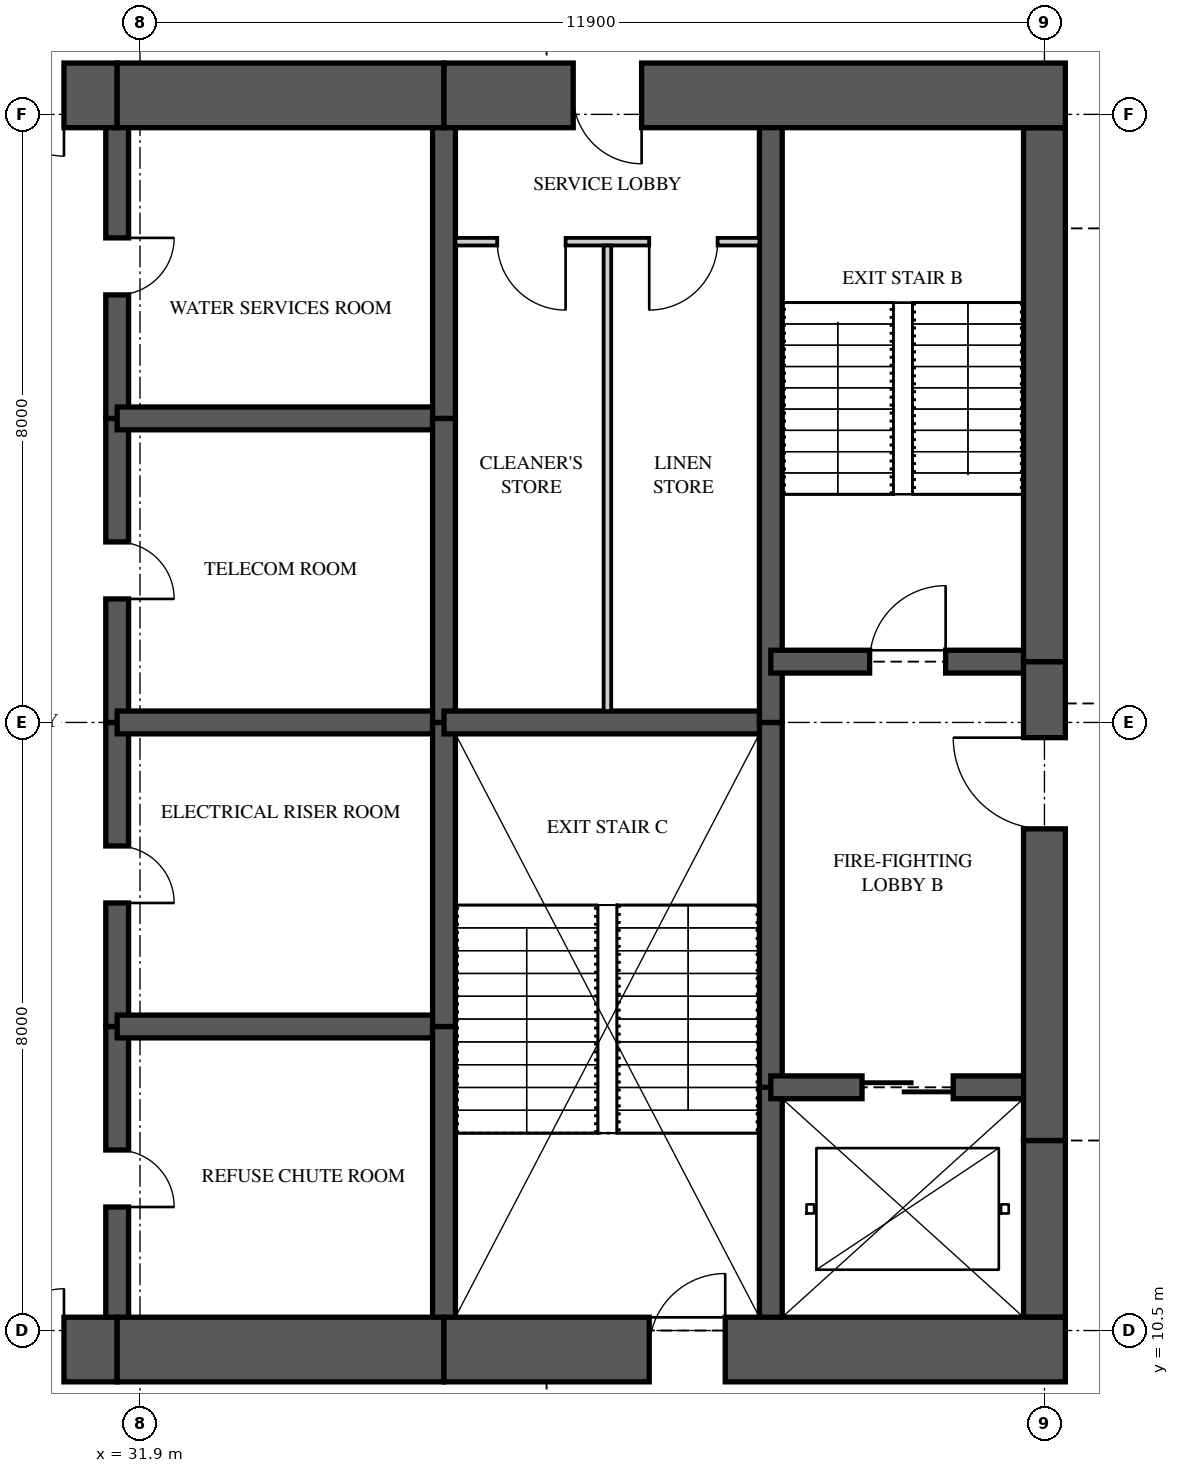
"""IFC4 building model, lengths in metres.
Left out: names, types, materials, properties, quantities, classifications, styles, units other than length and angle.
Written with IfcOpenShell. Run it as: python <this file> out.ifc"""

import sys

from ifc_helpers import new_model, si_unit, direction, frame, frame_2d, origin, place, context, subcontext, project, spatial, rectangle, extrude, element, fill, save


model = new_model("IFC4")
c1 = context("Model", 3, precision=1e-05, world=origin(), true_north=direction((0.0, 1.0)))
c2 = subcontext(c1, "Body", "Model", "MODEL_VIEW")
j1 = project(units=[si_unit("LENGTHUNIT", "METRE"), si_unit("PLANEANGLEUNIT", "RADIAN")], contexts=[c1])
p1 = place(None, origin())
s1 = spatial("IfcSite", under=j1, at=p1, CompositionType="ELEMENT")
p2 = place(p1, origin())
s2 = spatial("IfcBuilding", under=s1, at=p2, CompositionType="ELEMENT")
p3 = place(p2, frame((0.0, 0.0, 267.75)))
s3 = spatial("IfcBuildingStorey", under=s2, at=p3, CompositionType="ELEMENT", Elevation=267.75)
p4 = place(p3, frame((26.0, 10.25, 0.0), z_axis=(0.0, 0.0, 1.0), x_axis=(1.0, 0.0, 0.0)))
e1 = element("IfcWall", 1, at=p4, inside=s3, PredefinedType="SHEAR", context=c2, shape_type="SweptSolid", body=[
    extrude(rectangle(XDim=5.6, YDim=0.85, at=frame_2d((2.8, 0.0))), origin(), (0.0, 0.0, 1.0), 5.0),
])
p5 = place(p4, frame((3.3, 0.0, 0.0)))
e2 = element("IfcOpeningElement", 2, at=p5, cuts=e1, PredefinedType="OPENING", context=c2, shape_type="SweptSolid", body=[
    extrude(rectangle(XDim=1.6, YDim=2.1, at=frame_2d((0.8, 1.05))), frame((0.0, 0.435, 0.0), z_axis=(0.0, -1.0, 0.0), x_axis=(1.0, 0.0, 0.0)), (0.0, 0.0, 1.0), 0.87),
])
p6 = place(p3, frame((31.6, 10.25, 0.0), z_axis=(0.0, 0.0, 1.0), x_axis=(1.0, 0.0, 0.0)))
e3 = element("IfcWall", 3, at=p6, inside=s3, PredefinedType="SHEAR", context=c2, shape_type="SweptSolid", body=[
    extrude(rectangle(XDim=4.3, YDim=0.85, at=frame_2d((2.15, 0.0))), origin(), (0.0, 0.0, 1.0), 5.0),
])
p7 = place(p3, frame((35.9, 10.25, 0.0), z_axis=(0.0, 0.0, 1.0), x_axis=(1.0, 0.0, 0.0)))
e4 = element("IfcWall", 4, at=p7, inside=s3, PredefinedType="SHEAR", context=c2, shape_type="SweptSolid", body=[
    extrude(rectangle(XDim=8.175, YDim=0.85, at=frame_2d((4.087, 0.0))), origin(), (0.0, 0.0, 1.0), 5.0),
])
p8 = place(p7, frame((2.7, 0.0, 0.0)))
e5 = element("IfcOpeningElement", 5, at=p8, cuts=e4, PredefinedType="OPENING", context=c2, shape_type="SweptSolid", body=[
    extrude(rectangle(XDim=1.0, YDim=2.1, at=frame_2d((0.5, 1.05))), frame((0.0, 0.435, 0.0), z_axis=(0.0, -1.0, 0.0), x_axis=(1.0, 0.0, 0.0)), (0.0, 0.0, 1.0), 0.87),
])
p9 = place(p3, frame((44.075, 26.75, 0.0), z_axis=(0.0, 0.0, 1.0), x_axis=(-1.0, 0.0, 0.0)))
e6 = element("IfcWall", 6, at=p9, inside=s3, PredefinedType="SHEAR", context=c2, shape_type="SweptSolid", body=[
    extrude(rectangle(XDim=8.175, YDim=0.85, at=frame_2d((4.087, 0.0))), origin(), (0.0, 0.0, 1.0), 5.0),
])
p10 = place(p9, frame((5.575, 0.0, 0.0)))
e7 = element("IfcOpeningElement", 7, at=p10, cuts=e6, PredefinedType="OPENING", context=c2, shape_type="SweptSolid", body=[
    extrude(rectangle(XDim=0.9, YDim=2.1, at=frame_2d((0.45, 1.05))), frame((0.0, 0.435, 0.0), z_axis=(0.0, -1.0, 0.0), x_axis=(1.0, 0.0, 0.0)), (0.0, 0.0, 1.0), 0.87),
])
p11 = place(p3, frame((35.9, 26.75, 0.0), z_axis=(0.0, 0.0, 1.0), x_axis=(-1.0, 0.0, 0.0)))
e8 = element("IfcWall", 8, at=p11, inside=s3, PredefinedType="SHEAR", context=c2, shape_type="SweptSolid", body=[
    extrude(rectangle(XDim=4.3, YDim=0.85, at=frame_2d((2.15, 0.0))), origin(), (0.0, 0.0, 1.0), 5.0),
])
p12 = place(p3, frame((31.6, 26.75, 0.0), z_axis=(0.0, 0.0, 1.0), x_axis=(-1.0, 0.0, 0.0)))
e9 = element("IfcWall", 9, at=p12, inside=s3, PredefinedType="SHEAR", context=c2, shape_type="SweptSolid", body=[
    extrude(rectangle(XDim=5.6, YDim=0.85, at=frame_2d((2.8, 0.0))), origin(), (0.0, 0.0, 1.0), 5.0),
])
p13 = place(p12, frame((0.7, 0.0, 0.0)))
e10 = element("IfcOpeningElement", 10, at=p13, cuts=e9, PredefinedType="OPENING", context=c2, shape_type="SweptSolid", body=[
    extrude(rectangle(XDim=1.6, YDim=2.1, at=frame_2d((0.8, 1.05))), frame((0.0, 0.435, 0.0), z_axis=(0.0, -1.0, 0.0), x_axis=(1.0, 0.0, 0.0)), (0.0, 0.0, 1.0), 0.87),
])
p14 = place(p3, frame((43.8, 10.675, 0.0), z_axis=(0.0, 0.0, 1.0), x_axis=(0.0, 1.0, 0.0)))
e11 = element("IfcWall", 11, at=p14, inside=s3, PredefinedType="SHEAR", context=c2, shape_type="SweptSolid", body=[
    extrude(rectangle(XDim=2.325, YDim=0.55, at=frame_2d((1.163, 0.0))), origin(), (0.0, 0.0, 1.0), 5.0),
])
p15 = place(p3, frame((43.8, 13.0, 0.0), z_axis=(0.0, 0.0, 1.0), x_axis=(0.0, 1.0, 0.0)))
e12 = element("IfcWall", 12, at=p15, inside=s3, PredefinedType="SHEAR", context=c2, shape_type="SweptSolid", body=[
    extrude(rectangle(XDim=6.3, YDim=0.55, at=frame_2d((3.15, 0.0))), origin(), (0.0, 0.0, 1.0), 5.0),
])
p16 = place(p15, frame((4.1, 0.0, 0.0)))
e13 = element("IfcOpeningElement", 13, at=p16, cuts=e12, PredefinedType="OPENING", context=c2, shape_type="SweptSolid", body=[
    extrude(rectangle(XDim=1.2, YDim=2.2, at=frame_2d((0.6, 1.1))), frame((0.0, 0.285, 0.0), z_axis=(0.0, -1.0, 0.0), x_axis=(1.0, 0.0, 0.0)), (0.0, 0.0, 1.0), 0.57),
])
p17 = place(p3, frame((43.8, 19.3, 0.0), z_axis=(0.0, 0.0, 1.0), x_axis=(0.0, 1.0, 0.0)))
e14 = element("IfcWall", 14, at=p17, inside=s3, PredefinedType="SHEAR", context=c2, shape_type="SweptSolid", body=[
    extrude(rectangle(XDim=7.025, YDim=0.55, at=frame_2d((3.512, 0.0))), origin(), (0.0, 0.0, 1.0), 5.0),
])
p18 = place(p3, frame((31.6, 10.25, 0.0), z_axis=(0.0, 0.0, 1.0), x_axis=(0.0, 1.0, 0.0)))
e15 = element("IfcWall", 15, at=p18, inside=s3, PredefinedType="SHEAR", context=c2, shape_type="SweptSolid", body=[
    extrude(rectangle(XDim=4.25, YDim=0.3, at=frame_2d((2.125, 0.0))), origin(), (0.0, 0.0, 1.0), 5.0),
])
p19 = place(p18, frame((1.875, 0.0, 0.0)))
e16 = element("IfcOpeningElement", 16, at=p19, cuts=e15, PredefinedType="OPENING", context=c2, shape_type="SweptSolid", body=[
    extrude(rectangle(XDim=0.75, YDim=2.1, at=frame_2d((0.375, 1.05))), frame((0.0, 0.16, 0.0), z_axis=(0.0, -1.0, 0.0), x_axis=(1.0, 0.0, 0.0)), (0.0, 0.0, 1.0), 0.32),
])
p20 = place(p3, frame((31.6, 14.5, 0.0), z_axis=(0.0, 0.0, 1.0), x_axis=(0.0, 1.0, 0.0)))
e17 = element("IfcWall", 17, at=p20, inside=s3, PredefinedType="SHEAR", context=c2, shape_type="SweptSolid", body=[
    extrude(rectangle(XDim=4.0, YDim=0.3, at=frame_2d((2.0, 0.0))), origin(), (0.0, 0.0, 1.0), 5.0),
])
p21 = place(p20, frame((1.625, 0.0, 0.0)))
e18 = element("IfcOpeningElement", 18, at=p21, cuts=e17, PredefinedType="OPENING", context=c2, shape_type="SweptSolid", body=[
    extrude(rectangle(XDim=0.75, YDim=2.1, at=frame_2d((0.375, 1.05))), frame((0.0, 0.16, 0.0), z_axis=(0.0, -1.0, 0.0), x_axis=(1.0, 0.0, 0.0)), (0.0, 0.0, 1.0), 0.32),
])
p22 = place(p3, frame((31.6, 18.5, 0.0), z_axis=(0.0, 0.0, 1.0), x_axis=(0.0, 1.0, 0.0)))
e19 = element("IfcWall", 19, at=p22, inside=s3, PredefinedType="SHEAR", context=c2, shape_type="SweptSolid", body=[
    extrude(rectangle(XDim=4.0, YDim=0.3, at=frame_2d((2.0, 0.0))), origin(), (0.0, 0.0, 1.0), 5.0),
])
p23 = place(p22, frame((1.625, 0.0, 0.0)))
e20 = element("IfcOpeningElement", 20, at=p23, cuts=e19, PredefinedType="OPENING", context=c2, shape_type="SweptSolid", body=[
    extrude(rectangle(XDim=0.75, YDim=2.1, at=frame_2d((0.375, 1.05))), frame((0.0, 0.16, 0.0), z_axis=(0.0, -1.0, 0.0), x_axis=(1.0, 0.0, 0.0)), (0.0, 0.0, 1.0), 0.32),
])
p24 = place(p3, frame((31.6, 22.5, 0.0), z_axis=(0.0, 0.0, 1.0), x_axis=(0.0, 1.0, 0.0)))
e21 = element("IfcWall", 21, at=p24, inside=s3, PredefinedType="SHEAR", context=c2, shape_type="SweptSolid", body=[
    extrude(rectangle(XDim=4.25, YDim=0.3, at=frame_2d((2.125, 0.0))), origin(), (0.0, 0.0, 1.0), 5.0),
])
p25 = place(p24, frame((1.625, 0.0, 0.0)))
e22 = element("IfcOpeningElement", 22, at=p25, cuts=e21, PredefinedType="OPENING", context=c2, shape_type="SweptSolid", body=[
    extrude(rectangle(XDim=0.75, YDim=2.1, at=frame_2d((0.375, 1.05))), frame((0.0, 0.16, 0.0), z_axis=(0.0, -1.0, 0.0), x_axis=(1.0, 0.0, 0.0)), (0.0, 0.0, 1.0), 0.32),
])
p26 = place(p3, frame((35.9, 10.25, 0.0), z_axis=(0.0, 0.0, 1.0), x_axis=(0.0, 1.0, 0.0)))
e23 = element("IfcWall", 23, at=p26, inside=s3, PredefinedType="SHEAR", context=c2, shape_type="SweptSolid", body=[
    extrude(rectangle(XDim=4.25, YDim=0.3, at=frame_2d((2.125, 0.0))), origin(), (0.0, 0.0, 1.0), 5.0),
])
for number, where, z_axis, x_axis in (
    (24, (35.9, 14.5, 0.0), (0.0, 0.0, 1.0), (0.0, 1.0, 0.0)),
    (25, (35.9, 18.5, 0.0), (0.0, 0.0, 1.0), (0.0, 1.0, 0.0)),
):
    element("IfcWall", number, at=place(p3, frame(where, z_axis=z_axis, x_axis=x_axis)), inside=s3, PredefinedType="SHEAR", context=c2, shape_type="SweptSolid", body=[
        extrude(rectangle(XDim=4.0, YDim=0.3, at=frame_2d((2.0, 0.0))), origin(), (0.0, 0.0, 1.0), 5.0),
    ])
p27 = place(p3, frame((35.9, 22.5, 0.0), z_axis=(0.0, 0.0, 1.0), x_axis=(0.0, 1.0, 0.0)))
e26 = element("IfcWall", 26, at=p27, inside=s3, PredefinedType="SHEAR", context=c2, shape_type="SweptSolid", body=[
    extrude(rectangle(XDim=4.25, YDim=0.3, at=frame_2d((2.125, 0.0))), origin(), (0.0, 0.0, 1.0), 5.0),
])
p28 = place(p3, frame((40.2, 10.25, 0.0), z_axis=(0.0, 0.0, 1.0), x_axis=(0.0, 1.0, 0.0)))
e27 = element("IfcWall", 27, at=p28, inside=s3, PredefinedType="SHEAR", context=c2, shape_type="SweptSolid", body=[
    extrude(rectangle(XDim=3.45, YDim=0.3, at=frame_2d((1.725, 0.0))), origin(), (0.0, 0.0, 1.0), 5.0),
])
p29 = place(p3, frame((40.2, 13.7, 0.0), z_axis=(0.0, 0.0, 1.0), x_axis=(0.0, 1.0, 0.0)))
e28 = element("IfcWall", 28, at=p29, inside=s3, PredefinedType="SHEAR", context=c2, shape_type="SweptSolid", body=[
    extrude(rectangle(XDim=4.8, YDim=0.3, at=frame_2d((2.4, 0.0))), origin(), (0.0, 0.0, 1.0), 5.0),
])
p30 = place(p3, frame((40.2, 18.5, 0.0), z_axis=(0.0, 0.0, 1.0), x_axis=(0.0, 1.0, 0.0)))
e29 = element("IfcWall", 29, at=p30, inside=s3, PredefinedType="SHEAR", context=c2, shape_type="SweptSolid", body=[
    extrude(rectangle(XDim=8.25, YDim=0.3, at=frame_2d((4.125, 0.0))), origin(), (0.0, 0.0, 1.0), 5.0),
])
for number, where, z_axis, x_axis in (
    (30, (31.6, 14.5, 0.0), (0.0, 0.0, 1.0), (1.0, 0.0, 0.0)),
    (31, (31.6, 18.5, 0.0), (0.0, 0.0, 1.0), (1.0, 0.0, 0.0)),
    (32, (31.6, 22.5, 0.0), (0.0, 0.0, 1.0), (1.0, 0.0, 0.0)),
):
    element("IfcWall", number, at=place(p3, frame(where, z_axis=z_axis, x_axis=x_axis)), inside=s3, PredefinedType="SHEAR", context=c2, shape_type="SweptSolid", body=[
        extrude(rectangle(XDim=4.3, YDim=0.3, at=frame_2d((2.15, 0.0))), origin(), (0.0, 0.0, 1.0), 5.0),
    ])
p31 = place(p3, frame((35.9, 18.5, 0.0), z_axis=(0.0, 0.0, 1.0), x_axis=(1.0, 0.0, 0.0)))
e33 = element("IfcWall", 33, at=p31, inside=s3, PredefinedType="SHEAR", context=c2, shape_type="SweptSolid", body=[
    extrude(rectangle(XDim=4.3, YDim=0.3, at=frame_2d((2.15, 0.0))), origin(), (0.0, 0.0, 1.0), 5.0),
])
p32 = place(p3, frame((40.2, 13.7, 0.0), z_axis=(0.0, 0.0, 1.0), x_axis=(1.0, 0.0, 0.0)))
e34 = element("IfcWall", 34, at=p32, inside=s3, PredefinedType="SHEAR", context=c2, shape_type="SweptSolid", body=[
    extrude(rectangle(XDim=3.6, YDim=0.3, at=frame_2d((1.8, 0.0))), origin(), (0.0, 0.0, 1.0), 5.0),
])
p33 = place(p32, frame((1.2, 0.0, 0.0)))
e35 = element("IfcOpeningElement", 35, at=p33, cuts=e34, PredefinedType="OPENING", context=c2, shape_type="SweptSolid", body=[
    extrude(rectangle(XDim=1.2, YDim=2.1, at=frame_2d((0.6, 1.05))), frame((0.0, 0.16, 0.0), z_axis=(0.0, -1.0, 0.0), x_axis=(1.0, 0.0, 0.0)), (0.0, 0.0, 1.0), 0.32),
])
p34 = place(p3, frame((40.2, 19.3, 0.0), z_axis=(0.0, 0.0, 1.0), x_axis=(1.0, 0.0, 0.0)))
e36 = element("IfcWall", 36, at=p34, inside=s3, PredefinedType="SHEAR", context=c2, shape_type="SweptSolid", body=[
    extrude(rectangle(XDim=3.6, YDim=0.3, at=frame_2d((1.8, 0.0))), origin(), (0.0, 0.0, 1.0), 5.0),
])
p35 = place(p34, frame((1.3, 0.0, 0.0)))
e37 = element("IfcOpeningElement", 37, at=p35, cuts=e36, PredefinedType="OPENING", context=c2, shape_type="SweptSolid", body=[
    extrude(rectangle(XDim=1.0, YDim=2.1, at=frame_2d((0.5, 1.05))), frame((0.0, 0.16, 0.0), z_axis=(0.0, -1.0, 0.0), x_axis=(1.0, 0.0, 0.0)), (0.0, 0.0, 1.0), 0.32),
])
p36 = place(p3, frame((36.05, 24.825, 0.0), z_axis=(0.0, 0.0, 1.0), x_axis=(1.0, 0.0, 0.0)))
e38 = element("IfcWall", 38, at=p36, inside=s3, PredefinedType="PARTITIONING", context=c2, shape_type="SweptSolid", body=[
    extrude(rectangle(XDim=4.0, YDim=0.1, at=frame_2d((2.0, 0.0))), origin(), (0.0, 0.0, 1.0), 4.72),
])
p37 = place(p36, frame((0.55, 0.0, 0.0)))
e39 = element("IfcOpeningElement", 39, at=p37, cuts=e38, PredefinedType="OPENING", context=c2, shape_type="SweptSolid", body=[
    extrude(rectangle(XDim=0.9, YDim=2.1, at=frame_2d((0.45, 1.05))), frame((0.0, 0.06, 0.0), z_axis=(0.0, -1.0, 0.0), x_axis=(1.0, 0.0, 0.0)), (0.0, 0.0, 1.0), 0.12),
])
p38 = place(p36, frame((2.55, 0.0, 0.0)))
e40 = element("IfcOpeningElement", 40, at=p38, cuts=e38, PredefinedType="OPENING", context=c2, shape_type="SweptSolid", body=[
    extrude(rectangle(XDim=0.9, YDim=2.1, at=frame_2d((0.45, 1.05))), frame((0.0, 0.06, 0.0), z_axis=(0.0, -1.0, 0.0), x_axis=(1.0, 0.0, 0.0)), (0.0, 0.0, 1.0), 0.12),
])
p39 = place(p3, frame((38.05, 18.65, 0.0), z_axis=(0.0, 0.0, 1.0), x_axis=(0.0, 1.0, 0.0)))
e41 = element("IfcWall", 41, at=p39, inside=s3, PredefinedType="PARTITIONING", context=c2, shape_type="SweptSolid", body=[
    extrude(rectangle(XDim=6.125, YDim=0.1, at=frame_2d((3.062, 0.0))), origin(), (0.0, 0.0, 1.0), 4.72),
])
p40 = place(p37, frame((0.9, 0.0, 0.0), z_axis=(0.0, 0.0, 1.0), x_axis=(-1.0, 0.0, 0.0)))
e42 = element("IfcDoor", 42, at=p40, inside=s3, OperationType="SINGLE_SWING_LEFT", PredefinedType="DOOR", context=c2, shape_type="SweptSolid", body=[
    extrude(rectangle(XDim=0.9, YDim=2.1, at=frame_2d((0.45, 1.05))), frame((0.0, 0.025, 0.0), z_axis=(0.0, -1.0, 0.0), x_axis=(1.0, 0.0, 0.0)), (0.0, 0.0, 1.0), 0.05),
])
fill(e39, e42)
p41 = place(p38, frame((0.9, 0.0, 0.0), z_axis=(0.0, 0.0, 1.0), x_axis=(-1.0, 0.0, 0.0)))
e43 = element("IfcDoor", 43, at=p41, inside=s3, OperationType="SINGLE_SWING_RIGHT", PredefinedType="DOOR", context=c2, shape_type="SweptSolid", body=[
    extrude(rectangle(XDim=0.9, YDim=2.1, at=frame_2d((0.45, 1.05))), frame((0.0, 0.025, 0.0), z_axis=(0.0, -1.0, 0.0), x_axis=(1.0, 0.0, 0.0)), (0.0, 0.0, 1.0), 0.05),
])
fill(e40, e43)
p42 = place(p35, origin())
e44 = element("IfcDoor", 44, at=p42, inside=s3, OperationType="SINGLE_SWING_RIGHT", PredefinedType="DOOR", context=c2, shape_type="SweptSolid", body=[
    extrude(rectangle(XDim=1.0, YDim=2.1, at=frame_2d((0.5, 1.05))), frame((0.0, 0.025, 0.0), z_axis=(0.0, -1.0, 0.0), x_axis=(1.0, 0.0, 0.0)), (0.0, 0.0, 1.0), 0.05),
])
fill(e37, e44)
p43 = place(p16, origin())
e45 = element("IfcDoor", 45, at=p43, inside=s3, OperationType="SINGLE_SWING_RIGHT", PredefinedType="DOOR", context=c2, shape_type="SweptSolid", body=[
    extrude(rectangle(XDim=1.2, YDim=2.2, at=frame_2d((0.6, 1.1))), frame((0.0, 0.025, 0.0), z_axis=(0.0, -1.0, 0.0), x_axis=(1.0, 0.0, 0.0)), (0.0, 0.0, 1.0), 0.05),
])
fill(e13, e45)
p44 = place(p33, origin())
e46 = element("IfcDoor", 46, at=p44, inside=s3, OperationType="SLIDING_TO_LEFT", PredefinedType="DOOR", context=c2, shape_type="SweptSolid", body=[
    extrude(rectangle(XDim=1.2, YDim=2.1, at=frame_2d((0.6, 1.05))), frame((0.0, 0.025, 0.0), z_axis=(0.0, -1.0, 0.0), x_axis=(1.0, 0.0, 0.0)), (0.0, 0.0, 1.0), 0.05),
])
fill(e35, e46)
p45 = place(p5, origin())
e47 = element("IfcDoor", 47, at=p45, inside=s3, OperationType="DOUBLE_DOOR_SINGLE_SWING", PredefinedType="DOOR", context=c2, shape_type="SweptSolid", body=[
    extrude(rectangle(XDim=1.6, YDim=2.1, at=frame_2d((0.8, 1.05))), frame((0.0, 0.025, 0.0), z_axis=(0.0, -1.0, 0.0), x_axis=(1.0, 0.0, 0.0)), (0.0, 0.0, 1.0), 0.05),
])
fill(e2, e47)
p46 = place(p13, origin())
e48 = element("IfcDoor", 48, at=p46, inside=s3, OperationType="DOUBLE_DOOR_SINGLE_SWING", PredefinedType="DOOR", context=c2, shape_type="SweptSolid", body=[
    extrude(rectangle(XDim=1.6, YDim=2.1, at=frame_2d((0.8, 1.05))), frame((0.0, 0.025, 0.0), z_axis=(0.0, -1.0, 0.0), x_axis=(1.0, 0.0, 0.0)), (0.0, 0.0, 1.0), 0.05),
])
fill(e10, e48)
p47 = place(p19, frame((0.75, 0.0, 0.0), z_axis=(0.0, 0.0, 1.0), x_axis=(-1.0, 0.0, 0.0)))
e49 = element("IfcDoor", 49, at=p47, inside=s3, OperationType="SINGLE_SWING_RIGHT", PredefinedType="DOOR", context=c2, shape_type="SweptSolid", body=[
    extrude(rectangle(XDim=0.75, YDim=2.1, at=frame_2d((0.375, 1.05))), frame((0.0, 0.025, 0.0), z_axis=(0.0, -1.0, 0.0), x_axis=(1.0, 0.0, 0.0)), (0.0, 0.0, 1.0), 0.05),
])
fill(e16, e49)
p48 = place(p21, frame((0.75, 0.0, 0.0), z_axis=(0.0, 0.0, 1.0), x_axis=(-1.0, 0.0, 0.0)))
e50 = element("IfcDoor", 50, at=p48, inside=s3, OperationType="SINGLE_SWING_RIGHT", PredefinedType="DOOR", context=c2, shape_type="SweptSolid", body=[
    extrude(rectangle(XDim=0.75, YDim=2.1, at=frame_2d((0.375, 1.05))), frame((0.0, 0.025, 0.0), z_axis=(0.0, -1.0, 0.0), x_axis=(1.0, 0.0, 0.0)), (0.0, 0.0, 1.0), 0.05),
])
fill(e18, e50)
p49 = place(p23, frame((0.75, 0.0, 0.0), z_axis=(0.0, 0.0, 1.0), x_axis=(-1.0, 0.0, 0.0)))
e51 = element("IfcDoor", 51, at=p49, inside=s3, OperationType="SINGLE_SWING_RIGHT", PredefinedType="DOOR", context=c2, shape_type="SweptSolid", body=[
    extrude(rectangle(XDim=0.75, YDim=2.1, at=frame_2d((0.375, 1.05))), frame((0.0, 0.025, 0.0), z_axis=(0.0, -1.0, 0.0), x_axis=(1.0, 0.0, 0.0)), (0.0, 0.0, 1.0), 0.05),
])
fill(e20, e51)
p50 = place(p25, frame((0.75, 0.0, 0.0), z_axis=(0.0, 0.0, 1.0), x_axis=(-1.0, 0.0, 0.0)))
e52 = element("IfcDoor", 52, at=p50, inside=s3, OperationType="SINGLE_SWING_LEFT", PredefinedType="DOOR", context=c2, shape_type="SweptSolid", body=[
    extrude(rectangle(XDim=0.75, YDim=2.1, at=frame_2d((0.375, 1.05))), frame((0.0, 0.025, 0.0), z_axis=(0.0, -1.0, 0.0), x_axis=(1.0, 0.0, 0.0)), (0.0, 0.0, 1.0), 0.05),
])
fill(e22, e52)
p51 = place(p8, origin())
e53 = element("IfcDoor", 53, at=p51, inside=s3, OperationType="SINGLE_SWING_RIGHT", PredefinedType="DOOR", context=c2, shape_type="SweptSolid", body=[
    extrude(rectangle(XDim=1.0, YDim=2.1, at=frame_2d((0.5, 1.05))), frame((0.0, 0.025, 0.0), z_axis=(0.0, -1.0, 0.0), x_axis=(1.0, 0.0, 0.0)), (0.0, 0.0, 1.0), 0.05),
])
fill(e5, e53)
p52 = place(p10, origin())
e54 = element("IfcDoor", 54, at=p52, inside=s3, OperationType="SINGLE_SWING_LEFT", PredefinedType="DOOR", context=c2, shape_type="SweptSolid", body=[
    extrude(rectangle(XDim=0.9, YDim=2.1, at=frame_2d((0.45, 1.05))), frame((0.0, 0.415, 0.0), z_axis=(0.0, -1.0, 0.0), x_axis=(1.0, 0.0, 0.0)), (0.0, 0.0, 1.0), 0.8),
])
fill(e7, e54)
save(model, sys.argv[1])
